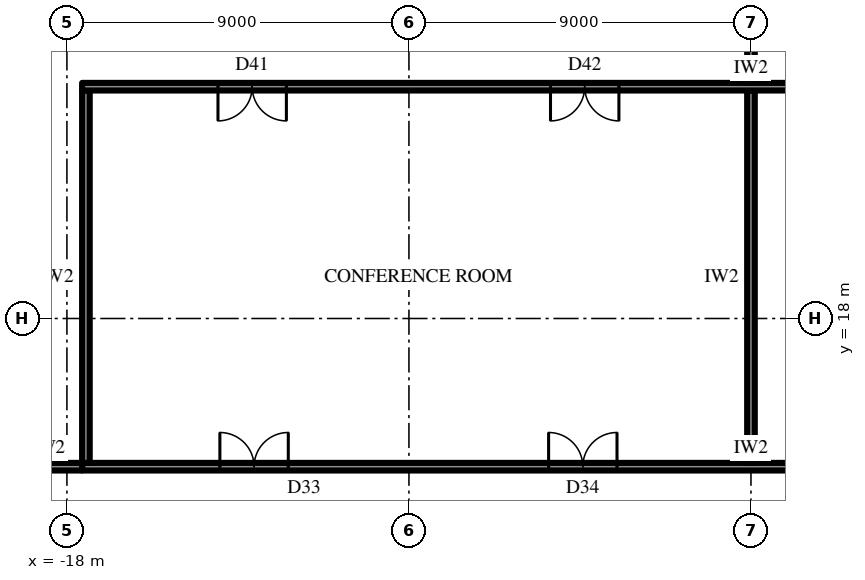
"""IFC4 building model, lengths in metres.
Left out: names, types, materials, properties, quantities, classifications, styles, units other than length and angle.
Written with IfcOpenShell. Run it as: python <this file> out.ifc"""

import sys

from ifc_helpers import new_model, si_unit, direction, frame, frame_2d, origin, place, context, subcontext, project, spatial, rectangle, extrude, element, fill, save


model = new_model("IFC4")
c1 = context("Model", 3, precision=1e-05, world=origin(), true_north=direction((0.0, 1.0)))
c2 = subcontext(c1, "Body", "Model", "MODEL_VIEW")
j1 = project(units=[si_unit("LENGTHUNIT", "METRE"), si_unit("PLANEANGLEUNIT", "RADIAN")], contexts=[c1])
p1 = place(None, origin())
s1 = spatial("IfcSite", under=j1, at=p1, CompositionType="ELEMENT")
p2 = place(p1, origin())
s2 = spatial("IfcBuilding", under=s1, at=p2, CompositionType="ELEMENT")
p3 = place(p2, frame((0.0, 0.0, 13.0)))
s3 = spatial("IfcBuildingStorey", under=s2, at=p3, CompositionType="ELEMENT", Elevation=13.0)
p4 = place(p3, frame((-17.6, 14.1, 0.0), z_axis=(0.0, 0.0, 1.0), x_axis=(1.0, 0.0, 0.0)))
e1 = element("IfcWall", 1, at=p4, inside=s3, PredefinedType="PARTITIONING", context=c2, shape_type="SweptSolid", body=[
    extrude(rectangle(XDim=35.2, YDim=0.2, at=frame_2d((17.6, 0.0))), origin(), (0.0, 0.0, 1.0), 5.15),
])
p5 = place(p4, frame((3.625, 0.0, 0.0)))
e2 = element("IfcOpeningElement", 2, at=p5, cuts=e1, PredefinedType="OPENING", context=c2, shape_type="SweptSolid", body=[
    extrude(rectangle(XDim=1.8, YDim=2.4, at=frame_2d((0.9, 1.2))), frame((0.0, 0.11, 0.0), z_axis=(0.0, -1.0, 0.0), x_axis=(1.0, 0.0, 0.0)), (0.0, 0.0, 1.0), 0.22),
])
p6 = place(p4, frame((12.275, 0.0, 0.0)))
e3 = element("IfcOpeningElement", 3, at=p6, cuts=e1, PredefinedType="OPENING", context=c2, shape_type="SweptSolid", body=[
    extrude(rectangle(XDim=1.8, YDim=2.4, at=frame_2d((0.9, 1.2))), frame((0.0, 0.11, 0.0), z_axis=(0.0, -1.0, 0.0), x_axis=(1.0, 0.0, 0.0)), (0.0, 0.0, 1.0), 0.22),
])
p7 = place(p4, frame((21.125, 0.0, 0.0)))
e4 = element("IfcOpeningElement", 4, at=p7, cuts=e1, PredefinedType="OPENING", context=c2, shape_type="SweptSolid", body=[
    extrude(rectangle(XDim=1.8, YDim=2.4, at=frame_2d((0.9, 1.2))), frame((0.0, 0.11, 0.0), z_axis=(0.0, -1.0, 0.0), x_axis=(1.0, 0.0, 0.0)), (0.0, 0.0, 1.0), 0.22),
])
p8 = place(p4, frame((29.775, 0.0, 0.0)))
e5 = element("IfcOpeningElement", 5, at=p8, cuts=e1, PredefinedType="OPENING", context=c2, shape_type="SweptSolid", body=[
    extrude(rectangle(XDim=1.8, YDim=2.4, at=frame_2d((0.9, 1.2))), frame((0.0, 0.11, 0.0), z_axis=(0.0, -1.0, 0.0), x_axis=(1.0, 0.0, 0.0)), (0.0, 0.0, 1.0), 0.22),
])
p9 = place(p3, frame((-17.5, 14.2, 0.0), z_axis=(0.0, 0.0, 1.0), x_axis=(0.0, 1.0, 0.0)))
e6 = element("IfcWall", 6, at=p9, inside=s3, PredefinedType="PARTITIONING", context=c2, shape_type="SweptSolid", body=[
    extrude(rectangle(XDim=9.8, YDim=0.2, at=frame_2d((4.9, 0.0))), origin(), (0.0, 0.0, 1.0), 5.15),
])
p10 = place(p3, frame((0.0, 14.2, 0.0), z_axis=(0.0, 0.0, 1.0), x_axis=(0.0, 1.0, 0.0)))
e7 = element("IfcWall", 7, at=p10, inside=s3, PredefinedType="PARTITIONING", context=c2, shape_type="SweptSolid", body=[
    extrude(rectangle(XDim=9.8, YDim=0.2, at=frame_2d((4.9, 0.0))), origin(), (0.0, 0.0, 1.0), 4.094),
])
p11 = place(p3, frame((-17.6, 24.1, 0.0), z_axis=(0.0, 0.0, 1.0), x_axis=(1.0, 0.0, 0.0)))
e8 = element("IfcWall", 8, at=p11, inside=s3, PredefinedType="PARTITIONING", context=c2, shape_type="SweptSolid", body=[
    extrude(rectangle(XDim=35.2, YDim=0.2, at=frame_2d((17.6, 0.0))), origin(), (0.0, 0.0, 1.0), 5.15),
])
p12 = place(p11, frame((3.575, 0.0, 0.0)))
e9 = element("IfcOpeningElement", 9, at=p12, cuts=e8, PredefinedType="OPENING", context=c2, shape_type="SweptSolid", body=[
    extrude(rectangle(XDim=1.8, YDim=2.4, at=frame_2d((0.9, 1.2))), frame((0.0, 0.11, 0.0), z_axis=(0.0, -1.0, 0.0), x_axis=(1.0, 0.0, 0.0)), (0.0, 0.0, 1.0), 0.22),
])
p13 = place(p11, frame((12.325, 0.0, 0.0)))
e10 = element("IfcOpeningElement", 10, at=p13, cuts=e8, PredefinedType="OPENING", context=c2, shape_type="SweptSolid", body=[
    extrude(rectangle(XDim=1.8, YDim=2.4, at=frame_2d((0.9, 1.2))), frame((0.0, 0.11, 0.0), z_axis=(0.0, -1.0, 0.0), x_axis=(1.0, 0.0, 0.0)), (0.0, 0.0, 1.0), 0.22),
])
p14 = place(p11, frame((21.075, 0.0, 0.0)))
e11 = element("IfcOpeningElement", 11, at=p14, cuts=e8, PredefinedType="OPENING", context=c2, shape_type="SweptSolid", body=[
    extrude(rectangle(XDim=1.8, YDim=2.4, at=frame_2d((0.9, 1.2))), frame((0.0, 0.11, 0.0), z_axis=(0.0, -1.0, 0.0), x_axis=(1.0, 0.0, 0.0)), (0.0, 0.0, 1.0), 0.22),
])
p15 = place(p11, frame((29.825, 0.0, 0.0)))
e12 = element("IfcOpeningElement", 12, at=p15, cuts=e8, PredefinedType="OPENING", context=c2, shape_type="SweptSolid", body=[
    extrude(rectangle(XDim=1.8, YDim=2.4, at=frame_2d((0.9, 1.2))), frame((0.0, 0.11, 0.0), z_axis=(0.0, -1.0, 0.0), x_axis=(1.0, 0.0, 0.0)), (0.0, 0.0, 1.0), 0.22),
])
p16 = place(p3, frame((-19.4, 14.1, 0.0), z_axis=(0.0, 0.0, 1.0), x_axis=(1.0, 0.0, 0.0)))
e13 = element("IfcWall", 13, at=p16, inside=s3, PredefinedType="PARTITIONING", context=c2, shape_type="SweptSolid", body=[
    extrude(rectangle(XDim=1.8, YDim=0.2, at=frame_2d((0.9, 0.0))), origin(), (0.0, 0.0, 1.0), 5.15),
])
p17 = place(p3, frame((0.0, 24.2, 0.0), z_axis=(0.0, 0.0, 1.0), x_axis=(0.0, 1.0, 0.0)))
e14 = element("IfcWall", 14, at=p17, inside=s3, PredefinedType="PARTITIONING", context=c2, shape_type="SweptSolid", body=[
    extrude(rectangle(XDim=9.52, YDim=0.2, at=frame_2d((4.76, 0.0))), origin(), (0.0, 0.0, 1.0), 4.094),
])
p18 = place(p12, frame((1.8, 0.0, 0.0), z_axis=(0.0, 0.0, 1.0), x_axis=(-1.0, 0.0, 0.0)))
e15 = element("IfcDoor", 15, at=p18, inside=s3, OperationType="DOUBLE_DOOR_SINGLE_SWING", PredefinedType="DOOR", context=c2, shape_type="SweptSolid", body=[
    extrude(rectangle(XDim=1.8, YDim=2.4, at=frame_2d((0.9, 1.2))), frame((0.0, 0.025, 0.0), z_axis=(0.0, -1.0, 0.0), x_axis=(1.0, 0.0, 0.0)), (0.0, 0.0, 1.0), 0.05),
])
fill(e9, e15)
p19 = place(p13, frame((1.8, 0.0, 0.0), z_axis=(0.0, 0.0, 1.0), x_axis=(-1.0, 0.0, 0.0)))
e16 = element("IfcDoor", 16, at=p19, inside=s3, OperationType="DOUBLE_DOOR_SINGLE_SWING", PredefinedType="DOOR", context=c2, shape_type="SweptSolid", body=[
    extrude(rectangle(XDim=1.8, YDim=2.4, at=frame_2d((0.9, 1.2))), frame((0.0, 0.025, 0.0), z_axis=(0.0, -1.0, 0.0), x_axis=(1.0, 0.0, 0.0)), (0.0, 0.0, 1.0), 0.05),
])
fill(e10, e16)
p20 = place(p5, origin())
e17 = element("IfcDoor", 17, at=p20, inside=s3, OperationType="DOUBLE_DOOR_SINGLE_SWING", PredefinedType="DOOR", context=c2, shape_type="SweptSolid", body=[
    extrude(rectangle(XDim=1.8, YDim=2.4, at=frame_2d((0.9, 1.2))), frame((0.0, 0.025, 0.0), z_axis=(0.0, -1.0, 0.0), x_axis=(1.0, 0.0, 0.0)), (0.0, 0.0, 1.0), 0.05),
])
fill(e2, e17)
p21 = place(p6, origin())
e18 = element("IfcDoor", 18, at=p21, inside=s3, OperationType="DOUBLE_DOOR_SINGLE_SWING", PredefinedType="DOOR", context=c2, shape_type="SweptSolid", body=[
    extrude(rectangle(XDim=1.8, YDim=2.4, at=frame_2d((0.9, 1.2))), frame((0.0, 0.025, 0.0), z_axis=(0.0, -1.0, 0.0), x_axis=(1.0, 0.0, 0.0)), (0.0, 0.0, 1.0), 0.05),
])
fill(e3, e18)
save(model, sys.argv[1])
